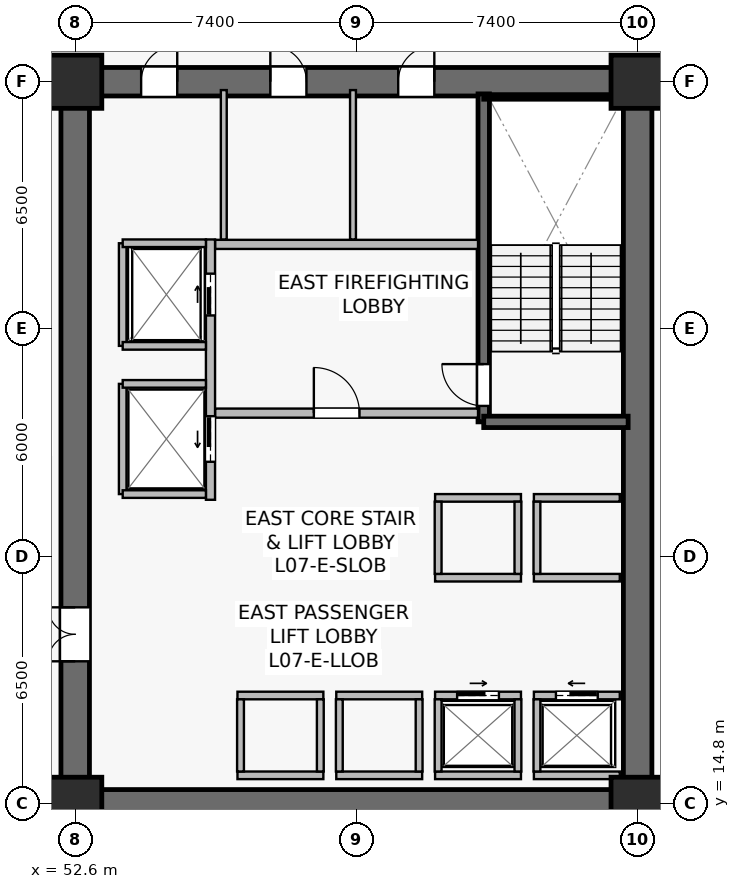
"""IFC4 building model, lengths in metres.
Left out: names, types, materials, properties, quantities, classifications, styles, units other than length and angle.
Written with IfcOpenShell. Run it as: python <this file> out.ifc"""

import sys

from ifc_helpers import new_model, si_unit, direction, frame, frame_2d, origin, origin_2d, place, context, subcontext, project, spatial, rectangle, extrude, source, transform, mapped, element, fill, save


model = new_model("IFC4")
c1 = context("Model", 3, precision=1e-05, world=origin(), true_north=direction((0.0, 1.0)))
c2 = subcontext(c1, "Body", "Model", "MODEL_VIEW")
j1 = project(units=[si_unit("LENGTHUNIT", "METRE"), si_unit("PLANEANGLEUNIT", "RADIAN")], contexts=[c1])
p1 = place(None, origin())
s1 = spatial("IfcSite", under=j1, at=p1, CompositionType="ELEMENT")
p2 = place(p1, origin())
s2 = spatial("IfcBuilding", under=s1, at=p2, CompositionType="ELEMENT")
p3 = place(p2, frame((0.0, 0.0, 29.3)))
s3 = spatial("IfcBuildingStorey", under=s2, at=p3, CompositionType="ELEMENT", Elevation=29.3)
p4 = place(p3, frame((52.225, 14.8, 0.0), z_axis=(0.0, 0.0, 1.0), x_axis=(1.0, 0.0, 0.0)))
e1 = element("IfcWall", 1, at=p4, inside=s3, PredefinedType="SHEAR", context=c2, shape_type="SweptSolid", body=[
    extrude(rectangle(XDim=15.55, YDim=0.75, at=frame_2d((7.775, 0.0))), origin(), (0.0, 0.0, 1.0), 3.78),
])
p5 = place(p3, frame((52.225, 33.8, 0.0), z_axis=(0.0, 0.0, 1.0), x_axis=(1.0, 0.0, 0.0)))
e2 = element("IfcWall", 2, at=p5, inside=s3, PredefinedType="SHEAR", context=c2, shape_type="SweptSolid", body=[
    extrude(rectangle(XDim=15.55, YDim=0.75, at=frame_2d((7.775, 0.0))), origin(), (0.0, 0.0, 1.0), 3.78),
])
p6 = place(p5, frame((8.875, 0.0, 0.0)))
e3 = element("IfcOpeningElement", 3, at=p6, cuts=e2, PredefinedType="OPENING", context=c2, shape_type="SweptSolid", body=[
    extrude(rectangle(XDim=0.95, YDim=2.15, at=frame_2d((0.475, 1.075))), frame((0.0, 0.385, 0.0), z_axis=(0.0, -1.0, 0.0), x_axis=(1.0, 0.0, 0.0)), (0.0, 0.0, 1.0), 0.77),
])
p7 = place(p5, frame((5.51, 0.0, 0.0)))
e4 = element("IfcOpeningElement", 4, at=p7, cuts=e2, PredefinedType="OPENING", context=c2, shape_type="SweptSolid", body=[
    extrude(rectangle(XDim=0.95, YDim=2.15, at=frame_2d((0.475, 1.075))), frame((0.0, 0.385, 0.0), z_axis=(0.0, -1.0, 0.0), x_axis=(1.0, 0.0, 0.0)), (0.0, 0.0, 1.0), 0.77),
])
p8 = place(p5, frame((2.11, 0.0, 0.0)))
e5 = element("IfcOpeningElement", 5, at=p8, cuts=e2, PredefinedType="OPENING", context=c2, shape_type="SweptSolid", body=[
    extrude(rectangle(XDim=0.95, YDim=2.15, at=frame_2d((0.475, 1.075))), frame((0.0, 0.385, 0.0), z_axis=(0.0, -1.0, 0.0), x_axis=(1.0, 0.0, 0.0)), (0.0, 0.0, 1.0), 0.77),
])
p9 = place(p3, frame((52.6, 15.175, 0.0), z_axis=(0.0, 0.0, 1.0), x_axis=(0.0, 1.0, 0.0)))
e6 = element("IfcWall", 6, at=p9, inside=s3, PredefinedType="SHEAR", context=c2, shape_type="SweptSolid", body=[
    extrude(rectangle(XDim=18.25, YDim=0.75, at=frame_2d((9.125, 0.0))), origin(), (0.0, 0.0, 1.0), 3.78),
])
p10 = place(p9, frame((3.375, 0.0, 0.0)))
e7 = element("IfcOpeningElement", 7, at=p10, cuts=e6, PredefinedType="OPENING", context=c2, shape_type="SweptSolid", body=[
    extrude(rectangle(XDim=1.42, YDim=2.2, at=frame_2d((0.71, 1.1))), frame((0.0, 0.385, 0.0), z_axis=(0.0, -1.0, 0.0), x_axis=(1.0, 0.0, 0.0)), (0.0, 0.0, 1.0), 0.77),
])
p11 = place(p3, frame((67.4, 15.175, 0.0), z_axis=(0.0, 0.0, 1.0), x_axis=(0.0, 1.0, 0.0)))
e8 = element("IfcWall", 8, at=p11, inside=s3, PredefinedType="SHEAR", context=c2, shape_type="SweptSolid", body=[
    extrude(rectangle(XDim=18.25, YDim=0.75, at=frame_2d((9.125, 0.0))), origin(), (0.0, 0.0, 1.0), 3.78),
])
p12 = place(p3, frame((63.35, 24.85, 0.0), z_axis=(0.0, 0.0, 1.0), x_axis=(0.0, 1.0, 0.0)))
e9 = element("IfcWall", 9, at=p12, inside=s3, PredefinedType="SHEAR", context=c2, shape_type="SweptSolid", body=[
    extrude(rectangle(XDim=8.63, YDim=0.3, at=frame_2d((4.315, 0.0))), origin(), (0.0, 0.0, 1.0), 3.78),
])
p13 = place(p12, frame((0.42, 0.0, 0.0)))
e10 = element("IfcOpeningElement", 10, at=p13, cuts=e9, PredefinedType="OPENING", context=c2, shape_type="SweptSolid", body=[
    extrude(rectangle(XDim=1.1, YDim=2.15, at=frame_2d((0.55, 1.075))), frame((0.0, 0.16, 0.0), z_axis=(0.0, -1.0, 0.0), x_axis=(1.0, 0.0, 0.0)), (0.0, 0.0, 1.0), 0.32),
])
p14 = place(p3, frame((63.35, 24.85, 0.0), z_axis=(0.0, 0.0, 1.0), x_axis=(1.0, 0.0, 0.0)))
e11 = element("IfcWall", 11, at=p14, inside=s3, PredefinedType="SHEAR", context=c2, shape_type="SweptSolid", body=[
    extrude(rectangle(XDim=3.8, YDim=0.3, at=frame_2d((1.9, 0.0))), origin(), (0.0, 0.0, 1.0), 3.78),
])
p15 = place(p3, frame((63.35, 33.4, 0.0), z_axis=(0.0, 0.0, 1.0), x_axis=(1.0, 0.0, 0.0)))
e12 = element("IfcWall", 12, at=p15, inside=s3, PredefinedType="SOLIDWALL", context=c2, shape_type="SweptSolid", body=[
    extrude(rectangle(XDim=3.72, YDim=0.12, at=frame_2d((1.86, 0.0))), origin(), (0.0, 0.0, 1.0), 3.78),
])
m1 = source(origin(), c2, "Body", "SweptSolid", [
    extrude(rectangle(XDim=1.4, YDim=1.4, at=origin_2d()), origin(), (0.0, 0.0, 1.0), 4.1),
])
for number, where, z_axis, x_axis in (
    (13, (52.6, 14.8, 0.0), (0.0, 0.0, 1.0), (1.0, 0.0, 0.0)),
    (14, (67.4, 14.8, 0.0), (0.0, 0.0, 1.0), (1.0, 0.0, 0.0)),
    (15, (52.6, 33.8, 0.0), (0.0, 0.0, 1.0), (1.0, 0.0, 0.0)),
    (16, (67.4, 33.8, 0.0), (0.0, 0.0, 1.0), (1.0, 0.0, 0.0)),
):
    element("IfcColumn", number, at=place(p3, frame(where, z_axis=z_axis, x_axis=x_axis)), inside=s3, PredefinedType="COLUMN", context=c2, shape_type="MappedRepresentation", body=[
        mapped(m1, transform((0.0, 0.0, 0.0), scale=1.0)),
    ])
p16 = place(p3, frame((56.28, 25.08, 0.0), z_axis=(0.0, 0.0, 1.0), x_axis=(1.0, 0.0, 0.0)))
e17 = element("IfcWall", 17, at=p16, inside=s3, PredefinedType="SOLIDWALL", context=c2, shape_type="SweptSolid", body=[
    extrude(rectangle(XDim=6.92, YDim=0.24, at=frame_2d((3.46, 0.0))), origin(), (0.0, 0.0, 1.0), 3.065),
])
p17 = place(p16, frame((2.6, 0.0, 0.0)))
e18 = element("IfcOpeningElement", 18, at=p17, cuts=e17, PredefinedType="OPENING", context=c2, shape_type="SweptSolid", body=[
    extrude(rectangle(XDim=1.2, YDim=2.16, at=frame_2d((0.6, 1.08))), frame((0.0, 0.13, 0.0), z_axis=(0.0, -1.0, 0.0), x_axis=(1.0, 0.0, 0.0)), (0.0, 0.0, 1.0), 0.26),
])
p18 = place(p3, frame((56.28, 29.52, 0.0), z_axis=(0.0, 0.0, 1.0), x_axis=(1.0, 0.0, 0.0)))
e19 = element("IfcWall", 19, at=p18, inside=s3, PredefinedType="SOLIDWALL", context=c2, shape_type="SweptSolid", body=[
    extrude(rectangle(XDim=6.92, YDim=0.24, at=frame_2d((3.46, 0.0))), origin(), (0.0, 0.0, 1.0), 3.065),
])
p19 = place(p3, frame((56.16, 22.8, 0.0), z_axis=(0.0, 0.0, 1.0), x_axis=(0.0, 1.0, 0.0)))
e20 = element("IfcWall", 20, at=p19, inside=s3, PredefinedType="SOLIDWALL", context=c2, shape_type="SweptSolid", body=[
    extrude(rectangle(XDim=6.85, YDim=0.24, at=frame_2d((3.425, 0.0))), origin(), (0.0, 0.0, 1.0), 2.865),
])
p20 = place(p19, frame((4.85, 0.0, 0.0)))
e21 = element("IfcOpeningElement", 21, at=p20, cuts=e20, PredefinedType="OPENING", context=c2, shape_type="SweptSolid", body=[
    extrude(rectangle(XDim=1.1, YDim=2.22, at=frame_2d((0.55, 1.11))), frame((0.0, 0.13, 0.0), z_axis=(0.0, -1.0, 0.0), x_axis=(1.0, 0.0, 0.0)), (0.0, 0.0, 1.0), 0.26),
])
p21 = place(p19, frame((1.0, 0.0, 0.0)))
e22 = element("IfcOpeningElement", 22, at=p21, cuts=e20, PredefinedType="OPENING", context=c2, shape_type="SweptSolid", body=[
    extrude(rectangle(XDim=1.2, YDim=2.22, at=frame_2d((0.6, 1.11))), frame((0.0, 0.13, 0.0), z_axis=(0.0, -1.0, 0.0), x_axis=(1.0, 0.0, 0.0)), (0.0, 0.0, 1.0), 0.26),
])
p22 = place(p3, frame((64.67, 17.65, 0.0), z_axis=(0.0, 0.0, 1.0), x_axis=(1.0, 0.0, 0.0)))
e23 = element("IfcWall", 23, at=p22, inside=s3, PredefinedType="SOLIDWALL", context=c2, shape_type="SweptSolid", body=[
    extrude(rectangle(XDim=2.26, YDim=0.2, at=frame_2d((1.13, 0.0))), origin(), (0.0, 0.0, 1.0), 3.78),
])
p23 = place(p22, frame((0.58, 0.0, 0.0)))
e24 = element("IfcOpeningElement", 24, at=p23, cuts=e23, PredefinedType="OPENING", context=c2, shape_type="SweptSolid", body=[
    extrude(rectangle(XDim=1.1, YDim=2.22, at=frame_2d((0.55, 1.11))), frame((0.0, 0.11, 0.0), z_axis=(0.0, -1.0, 0.0), x_axis=(1.0, 0.0, 0.0)), (0.0, 0.0, 1.0), 0.22),
])
p24 = place(p3, frame((64.67, 15.55, 0.0), z_axis=(0.0, 0.0, 1.0), x_axis=(1.0, 0.0, 0.0)))
e25 = element("IfcWall", 25, at=p24, inside=s3, PredefinedType="SOLIDWALL", context=c2, shape_type="SweptSolid", body=[
    extrude(rectangle(XDim=2.26, YDim=0.2, at=frame_2d((1.13, 0.0))), origin(), (0.0, 0.0, 1.0), 3.78),
])
p25 = place(p3, frame((64.75, 15.65, 0.0), z_axis=(0.0, 0.0, 1.0), x_axis=(0.0, 1.0, 0.0)))
e26 = element("IfcWall", 26, at=p25, inside=s3, PredefinedType="SOLIDWALL", context=c2, shape_type="SweptSolid", body=[
    extrude(rectangle(XDim=1.9, YDim=0.18, at=frame_2d((0.95, 0.0))), origin(), (0.0, 0.0, 1.0), 3.78),
])
p26 = place(p3, frame((62.07, 17.65, 0.0), z_axis=(0.0, 0.0, 1.0), x_axis=(1.0, 0.0, 0.0)))
e27 = element("IfcWall", 27, at=p26, inside=s3, PredefinedType="SOLIDWALL", context=c2, shape_type="SweptSolid", body=[
    extrude(rectangle(XDim=2.26, YDim=0.2, at=frame_2d((1.13, 0.0))), origin(), (0.0, 0.0, 1.0), 3.78),
])
p27 = place(p26, frame((0.58, 0.0, 0.0)))
e28 = element("IfcOpeningElement", 28, at=p27, cuts=e27, PredefinedType="OPENING", context=c2, shape_type="SweptSolid", body=[
    extrude(rectangle(XDim=1.1, YDim=2.22, at=frame_2d((0.55, 1.11))), frame((0.0, 0.11, 0.0), z_axis=(0.0, -1.0, 0.0), x_axis=(1.0, 0.0, 0.0)), (0.0, 0.0, 1.0), 0.22),
])
p28 = place(p3, frame((62.07, 15.55, 0.0), z_axis=(0.0, 0.0, 1.0), x_axis=(1.0, 0.0, 0.0)))
e29 = element("IfcWall", 29, at=p28, inside=s3, PredefinedType="SOLIDWALL", context=c2, shape_type="SweptSolid", body=[
    extrude(rectangle(XDim=2.26, YDim=0.2, at=frame_2d((1.13, 0.0))), origin(), (0.0, 0.0, 1.0), 3.78),
])
for number, where, z_axis, x_axis in (
    (30, (62.15, 15.65, 0.0), (0.0, 0.0, 1.0), (0.0, 1.0, 0.0)),
    (31, (64.25, 15.65, 0.0), (0.0, 0.0, 1.0), (0.0, 1.0, 0.0)),
):
    element("IfcWall", number, at=place(p3, frame(where, z_axis=z_axis, x_axis=x_axis)), inside=s3, PredefinedType="SOLIDWALL", context=c2, shape_type="SweptSolid", body=[
        extrude(rectangle(XDim=1.9, YDim=0.18, at=frame_2d((0.95, 0.0))), origin(), (0.0, 0.0, 1.0), 3.78),
    ])
for number, where, z_axis, x_axis in (
    (32, (59.47, 17.65, 0.0), (0.0, 0.0, 1.0), (1.0, 0.0, 0.0)),
    (33, (59.47, 15.55, 0.0), (0.0, 0.0, 1.0), (1.0, 0.0, 0.0)),
):
    element("IfcWall", number, at=place(p3, frame(where, z_axis=z_axis, x_axis=x_axis)), inside=s3, PredefinedType="SOLIDWALL", context=c2, shape_type="SweptSolid", body=[
        extrude(rectangle(XDim=2.26, YDim=0.2, at=frame_2d((1.13, 0.0))), origin(), (0.0, 0.0, 1.0), 3.065),
    ])
for number, where, z_axis, x_axis in (
    (34, (59.55, 15.65, 0.0), (0.0, 0.0, 1.0), (0.0, 1.0, 0.0)),
    (35, (61.65, 15.65, 0.0), (0.0, 0.0, 1.0), (0.0, 1.0, 0.0)),
):
    element("IfcWall", number, at=place(p3, frame(where, z_axis=z_axis, x_axis=x_axis)), inside=s3, PredefinedType="SOLIDWALL", context=c2, shape_type="SweptSolid", body=[
        extrude(rectangle(XDim=1.9, YDim=0.18, at=frame_2d((0.95, 0.0))), origin(), (0.0, 0.0, 1.0), 3.78),
    ])
for number, where, z_axis, x_axis in (
    (36, (56.87, 17.65, 0.0), (0.0, 0.0, 1.0), (1.0, 0.0, 0.0)),
    (37, (56.87, 15.55, 0.0), (0.0, 0.0, 1.0), (1.0, 0.0, 0.0)),
):
    element("IfcWall", number, at=place(p3, frame(where, z_axis=z_axis, x_axis=x_axis)), inside=s3, PredefinedType="SOLIDWALL", context=c2, shape_type="SweptSolid", body=[
        extrude(rectangle(XDim=2.26, YDim=0.2, at=frame_2d((1.13, 0.0))), origin(), (0.0, 0.0, 1.0), 3.78),
    ])
for number, where, z_axis, x_axis in (
    (38, (56.95, 15.65, 0.0), (0.0, 0.0, 1.0), (0.0, 1.0, 0.0)),
    (39, (59.05, 15.65, 0.0), (0.0, 0.0, 1.0), (0.0, 1.0, 0.0)),
):
    element("IfcWall", number, at=place(p3, frame(where, z_axis=z_axis, x_axis=x_axis)), inside=s3, PredefinedType="SOLIDWALL", context=c2, shape_type="SweptSolid", body=[
        extrude(rectangle(XDim=1.9, YDim=0.18, at=frame_2d((0.95, 0.0))), origin(), (0.0, 0.0, 1.0), 3.78),
    ])
for number, where, z_axis, x_axis in (
    (40, (64.67, 20.75, 0.0), (0.0, 0.0, 1.0), (1.0, 0.0, 0.0)),
    (41, (64.67, 22.85, 0.0), (0.0, 0.0, 1.0), (1.0, 0.0, 0.0)),
):
    element("IfcWall", number, at=place(p3, frame(where, z_axis=z_axis, x_axis=x_axis)), inside=s3, PredefinedType="SOLIDWALL", context=c2, shape_type="SweptSolid", body=[
        extrude(rectangle(XDim=2.26, YDim=0.2, at=frame_2d((1.13, 0.0))), origin(), (0.0, 0.0, 1.0), 3.78),
    ])
p29 = place(p3, frame((64.75, 20.85, 0.0), z_axis=(0.0, 0.0, 1.0), x_axis=(0.0, 1.0, 0.0)))
e42 = element("IfcWall", 42, at=p29, inside=s3, PredefinedType="SOLIDWALL", context=c2, shape_type="SweptSolid", body=[
    extrude(rectangle(XDim=1.9, YDim=0.18, at=frame_2d((0.95, 0.0))), origin(), (0.0, 0.0, 1.0), 3.78),
])
for number, where, z_axis, x_axis in (
    (43, (62.07, 20.75, 0.0), (0.0, 0.0, 1.0), (1.0, 0.0, 0.0)),
    (44, (62.07, 22.85, 0.0), (0.0, 0.0, 1.0), (1.0, 0.0, 0.0)),
):
    element("IfcWall", number, at=place(p3, frame(where, z_axis=z_axis, x_axis=x_axis)), inside=s3, PredefinedType="SOLIDWALL", context=c2, shape_type="SweptSolid", body=[
        extrude(rectangle(XDim=2.26, YDim=0.2, at=frame_2d((1.13, 0.0))), origin(), (0.0, 0.0, 1.0), 3.78),
    ])
for number, where, z_axis, x_axis in (
    (45, (62.15, 20.85, 0.0), (0.0, 0.0, 1.0), (0.0, 1.0, 0.0)),
    (46, (64.25, 20.85, 0.0), (0.0, 0.0, 1.0), (0.0, 1.0, 0.0)),
):
    element("IfcWall", number, at=place(p3, frame(where, z_axis=z_axis, x_axis=x_axis)), inside=s3, PredefinedType="SOLIDWALL", context=c2, shape_type="SweptSolid", body=[
        extrude(rectangle(XDim=1.9, YDim=0.18, at=frame_2d((0.95, 0.0))), origin(), (0.0, 0.0, 1.0), 3.78),
    ])
p30 = place(p3, frame((53.85, 26.85, 0.0), z_axis=(0.0, 0.0, 1.0), x_axis=(0.0, 1.0, 0.0)))
e47 = element("IfcWall", 47, at=p30, inside=s3, PredefinedType="SOLIDWALL", context=c2, shape_type="SweptSolid", body=[
    extrude(rectangle(XDim=2.7, YDim=0.2, at=frame_2d((1.35, 0.0))), origin(), (0.0, 0.0, 1.0), 3.78),
])
p31 = place(p3, frame((53.85, 29.55, 0.0), z_axis=(0.0, 0.0, 1.0), x_axis=(1.0, 0.0, 0.0)))
e48 = element("IfcWall", 48, at=p31, inside=s3, PredefinedType="SOLIDWALL", context=c2, shape_type="SweptSolid", body=[
    extrude(rectangle(XDim=2.19, YDim=0.2, at=frame_2d((1.095, 0.0))), origin(), (0.0, 0.0, 1.0), 3.78),
])
p32 = place(p3, frame((53.85, 26.85, 0.0), z_axis=(0.0, 0.0, 1.0), x_axis=(1.0, 0.0, 0.0)))
e49 = element("IfcWall", 49, at=p32, inside=s3, PredefinedType="SOLIDWALL", context=c2, shape_type="SweptSolid", body=[
    extrude(rectangle(XDim=2.19, YDim=0.2, at=frame_2d((1.095, 0.0))), origin(), (0.0, 0.0, 1.0), 3.177),
])
p33 = place(p3, frame((53.85, 22.95, 0.0), z_axis=(0.0, 0.0, 1.0), x_axis=(0.0, 1.0, 0.0)))
e50 = element("IfcWall", 50, at=p33, inside=s3, PredefinedType="SOLIDWALL", context=c2, shape_type="SweptSolid", body=[
    extrude(rectangle(XDim=2.9, YDim=0.2, at=frame_2d((1.45, 0.0))), origin(), (0.0, 0.0, 1.0), 2.865),
])
for number, where, z_axis, x_axis in (
    (51, (53.85, 25.85, 0.0), (0.0, 0.0, 1.0), (1.0, 0.0, 0.0)),
    (52, (53.85, 22.95, 0.0), (0.0, 0.0, 1.0), (1.0, 0.0, 0.0)),
):
    element("IfcWall", number, at=place(p3, frame(where, z_axis=z_axis, x_axis=x_axis)), inside=s3, PredefinedType="SOLIDWALL", context=c2, shape_type="SweptSolid", body=[
        extrude(rectangle(XDim=2.19, YDim=0.2, at=frame_2d((1.095, 0.0))), origin(), (0.0, 0.0, 1.0), 3.78),
    ])
p34 = place(p3, frame((59.91, 29.65, 0.0), z_axis=(0.0, 0.0, 1.0), x_axis=(0.0, 1.0, 0.0)))
e53 = element("IfcWall", 53, at=p34, inside=s3, PredefinedType="PLUMBINGWALL", context=c2, shape_type="SweptSolid", body=[
    extrude(rectangle(XDim=3.93, YDim=0.155, at=frame_2d((1.965, 0.0))), origin(), (0.0, 0.0, 1.0), 3.065),
])
p35 = place(p3, frame((56.51, 29.65, 0.0), z_axis=(0.0, 0.0, 1.0), x_axis=(0.0, 1.0, 0.0)))
e54 = element("IfcWall", 54, at=p35, inside=s3, PredefinedType="PLUMBINGWALL", context=c2, shape_type="SweptSolid", body=[
    extrude(rectangle(XDim=3.93, YDim=0.155, at=frame_2d((1.965, 0.0))), origin(), (0.0, 0.0, 1.0), 3.78),
])
m2 = source(origin(), c2, "Body", "SweptSolid", [
    extrude(rectangle(XDim=1.1, YDim=2.15, at=frame_2d((0.55, 1.075))), frame((0.0, 0.025, 0.0), z_axis=(0.0, -1.0, 0.0), x_axis=(1.0, 0.0, 0.0)), (0.0, 0.0, 1.0), 0.05),
])
p36 = place(p13, origin())
e55 = element("IfcDoor", 55, at=p36, inside=s3, OperationType="SINGLE_SWING_RIGHT", PredefinedType="DOOR", context=c2, shape_type="MappedRepresentation", body=[
    mapped(m2, transform((0.0, 0.0, 0.0), scale=1.0)),
])
fill(e10, e55)
m3 = source(origin(), c2, "Body", "SweptSolid", [
    extrude(rectangle(XDim=1.2, YDim=2.16, at=frame_2d((0.6, 1.08))), frame((0.0, 0.025, 0.0), z_axis=(0.0, -1.0, 0.0), x_axis=(1.0, 0.0, 0.0)), (0.0, 0.0, 1.0), 0.05),
])
p37 = place(p17, origin())
e56 = element("IfcDoor", 56, at=p37, inside=s3, OperationType="SINGLE_SWING_LEFT", PredefinedType="DOOR", context=c2, shape_type="MappedRepresentation", body=[
    mapped(m3, transform((0.0, 0.0, 0.0), scale=1.0)),
])
fill(e18, e56)
m4 = source(origin(), c2, "Body", "SweptSolid", [
    extrude(rectangle(XDim=1.1, YDim=2.22, at=frame_2d((0.55, 1.11))), frame((0.0, 0.025, 0.0), z_axis=(0.0, -1.0, 0.0), x_axis=(1.0, 0.0, 0.0)), (0.0, 0.0, 1.0), 0.05),
])
p38 = place(p23, origin())
e57 = element("IfcDoor", 57, at=p38, inside=s3, OperationType="SLIDING_TO_LEFT", PredefinedType="USERDEFINED", context=c2, shape_type="MappedRepresentation", body=[
    mapped(m4, transform((0.0, 0.0, 0.0), scale=1.0)),
])
fill(e24, e57)
p39 = place(p27, origin())
e58 = element("IfcDoor", 58, at=p39, inside=s3, OperationType="SLIDING_TO_RIGHT", PredefinedType="USERDEFINED", context=c2, shape_type="MappedRepresentation", body=[
    mapped(m4, transform((0.0, 0.0, 0.0), scale=1.0)),
])
fill(e28, e58)
p40 = place(p20, origin())
e59 = element("IfcDoor", 59, at=p40, inside=s3, OperationType="SLIDING_TO_RIGHT", PredefinedType="USERDEFINED", context=c2, shape_type="MappedRepresentation", body=[
    mapped(m4, transform((0.0, 0.0, 0.0), scale=1.0)),
])
fill(e21, e59)
m5 = source(origin(), c2, "Body", "SweptSolid", [
    extrude(rectangle(XDim=1.2, YDim=2.22, at=frame_2d((0.6, 1.11))), frame((0.0, 0.025, 0.0), z_axis=(0.0, -1.0, 0.0), x_axis=(1.0, 0.0, 0.0)), (0.0, 0.0, 1.0), 0.05),
])
p41 = place(p21, origin())
e60 = element("IfcDoor", 60, at=p41, inside=s3, OperationType="SLIDING_TO_LEFT", PredefinedType="USERDEFINED", context=c2, shape_type="MappedRepresentation", body=[
    mapped(m5, transform((0.0, 0.0, 0.0), scale=1.0)),
])
fill(e22, e60)
m6 = source(origin(), c2, "Body", "SweptSolid", [
    extrude(rectangle(XDim=1.42, YDim=2.2, at=frame_2d((0.71, 1.1))), frame((0.0, 0.025, 0.0), z_axis=(0.0, -1.0, 0.0), x_axis=(1.0, 0.0, 0.0)), (0.0, 0.0, 1.0), 0.05),
])
p42 = place(p10, origin())
e61 = element("IfcDoor", 61, at=p42, inside=s3, OperationType="DOUBLE_DOOR_SINGLE_SWING", PredefinedType="DOOR", context=c2, shape_type="MappedRepresentation", body=[
    mapped(m6, transform((0.0, 0.0, 0.0), scale=1.0)),
])
fill(e7, e61)
m7 = source(origin(), c2, "Body", "SweptSolid", [
    extrude(rectangle(XDim=0.95, YDim=2.15, at=frame_2d((0.475, 1.075))), frame((0.0, 0.025, 0.0), z_axis=(0.0, -1.0, 0.0), x_axis=(1.0, 0.0, 0.0)), (0.0, 0.0, 1.0), 0.05),
])
p43 = place(p6, origin())
e62 = element("IfcDoor", 62, at=p43, inside=s3, OperationType="SINGLE_SWING_RIGHT", PredefinedType="DOOR", context=c2, shape_type="MappedRepresentation", body=[
    mapped(m7, transform((0.0, 0.0, 0.0), scale=1.0)),
])
fill(e3, e62)
p44 = place(p7, origin())
e63 = element("IfcDoor", 63, at=p44, inside=s3, OperationType="SINGLE_SWING_LEFT", PredefinedType="DOOR", context=c2, shape_type="MappedRepresentation", body=[
    mapped(m7, transform((0.0, 0.0, 0.0), scale=1.0)),
])
fill(e4, e63)
p45 = place(p8, origin())
e64 = element("IfcDoor", 64, at=p45, inside=s3, OperationType="SINGLE_SWING_RIGHT", PredefinedType="DOOR", context=c2, shape_type="MappedRepresentation", body=[
    mapped(m7, transform((0.0, 0.0, 0.0), scale=1.0)),
])
fill(e5, e64)
save(model, sys.argv[1])
